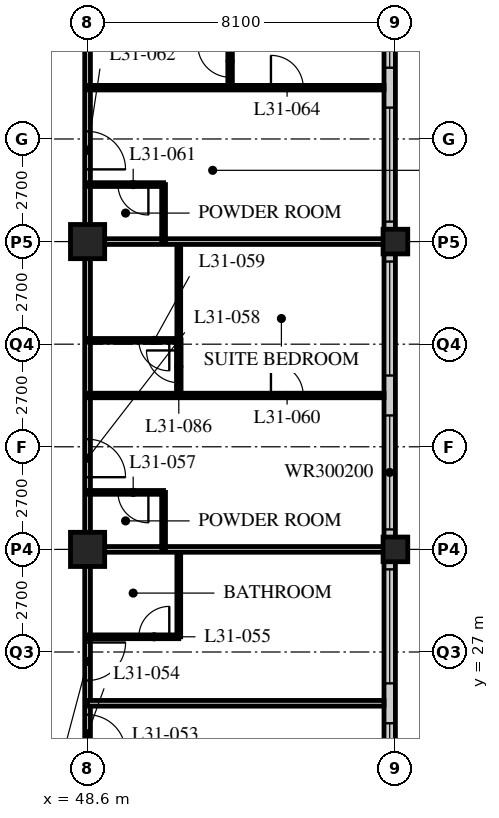
"""IFC4 building model, lengths in metres.
Left out: names, types, materials, properties, quantities, classifications, styles, units other than length and angle.
Written with IfcOpenShell. Run it as: python <this file> out.ifc"""

import sys

from ifc_helpers import new_model, si_unit, direction, frame, frame_2d, origin, origin_2d, place, context, subcontext, project, spatial, rectangle, hollow_rectangle, extrude, element, fill, save


model = new_model("IFC4")
c1 = context("Model", 3, precision=1e-05, world=origin(), true_north=direction((0.0, 1.0)))
c2 = subcontext(c1, "Body", "Model", "MODEL_VIEW")
j1 = project(units=[si_unit("LENGTHUNIT", "METRE"), si_unit("PLANEANGLEUNIT", "RADIAN")], contexts=[c1])
p1 = place(None, origin())
s1 = spatial("IfcSite", under=j1, at=p1, CompositionType="ELEMENT")
p2 = place(p1, origin())
s2 = spatial("IfcBuilding", under=s1, at=p2, CompositionType="ELEMENT")
p3 = place(p2, frame((0.0, 0.0, 123.8)))
s3 = spatial("IfcBuildingStorey", under=s2, at=p3, CompositionType="ELEMENT", Elevation=123.8)
for number, where, z_axis, x_axis in (
    (1, (48.6, 29.7, 0.0), (0.0, 0.0, 1.0), (1.0, 0.0, 0.0)),
    (2, (48.6, 37.8, 0.0), (0.0, 0.0, 1.0), (1.0, 0.0, 0.0)),
):
    element("IfcColumn", number, at=place(p3, frame(where, z_axis=z_axis, x_axis=x_axis)), inside=s3, PredefinedType="COLUMN", context=c2, shape_type="SweptSolid", body=[
        extrude(hollow_rectangle(XDim=0.9, YDim=0.9, WallThickness=0.09, at=origin_2d()), origin(), (0.0, 0.0, 1.0), 3.4),
    ])
for number, where, z_axis, x_axis in (
    (3, (56.7, 29.7, 0.0), (0.0, 0.0, 1.0), (1.0, 0.0, 0.0)),
    (4, (56.7, 37.8, 0.0), (0.0, 0.0, 1.0), (1.0, 0.0, 0.0)),
):
    element("IfcColumn", number, at=place(p3, frame(where, z_axis=z_axis, x_axis=x_axis)), inside=s3, PredefinedType="COLUMN", context=c2, shape_type="SweptSolid", body=[
        extrude(hollow_rectangle(XDim=0.65, YDim=0.65, WallThickness=0.055, at=origin_2d()), origin(), (0.0, 0.0, 1.0), 3.4),
    ])
p4 = place(p3, frame((56.55, 13.8, 0.0), z_axis=(0.0, 0.0, 1.0), x_axis=(0.0, 1.0, 0.0)))
e5 = element("IfcWall", 5, at=p4, inside=s3, PredefinedType="SOLIDWALL", context=c2, shape_type="SweptSolid", body=[
    extrude(rectangle(XDim=32.1, YDim=0.3, at=frame_2d((16.05, 0.0))), origin(), (0.0, 0.0, 1.0), 3.19),
])
p5 = place(p4, frame((0.225, 0.0, 0.9)))
e6 = element("IfcOpeningElement", 6, at=p5, cuts=e5, PredefinedType="OPENING", context=c2, shape_type="SweptSolid", body=[
    extrude(rectangle(XDim=3.0, YDim=2.0, at=frame_2d((1.5, 1.0))), frame((0.0, 0.16, 0.0), z_axis=(0.0, -1.0, 0.0), x_axis=(1.0, 0.0, 0.0)), (0.0, 0.0, 1.0), 0.32),
])
p6 = place(p4, frame((4.275, 0.0, 0.9)))
e7 = element("IfcOpeningElement", 7, at=p6, cuts=e5, PredefinedType="OPENING", context=c2, shape_type="SweptSolid", body=[
    extrude(rectangle(XDim=3.0, YDim=2.0, at=frame_2d((1.5, 1.0))), frame((0.0, 0.16, 0.0), z_axis=(0.0, -1.0, 0.0), x_axis=(1.0, 0.0, 0.0)), (0.0, 0.0, 1.0), 0.32),
])
p7 = place(p4, frame((8.325, 0.0, 0.9)))
e8 = element("IfcOpeningElement", 8, at=p7, cuts=e5, PredefinedType="OPENING", context=c2, shape_type="SweptSolid", body=[
    extrude(rectangle(XDim=3.0, YDim=2.0, at=frame_2d((1.5, 1.0))), frame((0.0, 0.16, 0.0), z_axis=(0.0, -1.0, 0.0), x_axis=(1.0, 0.0, 0.0)), (0.0, 0.0, 1.0), 0.32),
])
p8 = place(p4, frame((12.375, 0.0, 0.9)))
e9 = element("IfcOpeningElement", 9, at=p8, cuts=e5, PredefinedType="OPENING", context=c2, shape_type="SweptSolid", body=[
    extrude(rectangle(XDim=3.0, YDim=2.0, at=frame_2d((1.5, 1.0))), frame((0.0, 0.16, 0.0), z_axis=(0.0, -1.0, 0.0), x_axis=(1.0, 0.0, 0.0)), (0.0, 0.0, 1.0), 0.32),
])
p9 = place(p4, frame((16.425, 0.0, 0.9)))
e10 = element("IfcOpeningElement", 10, at=p9, cuts=e5, PredefinedType="OPENING", context=c2, shape_type="SweptSolid", body=[
    extrude(rectangle(XDim=3.0, YDim=2.0, at=frame_2d((1.5, 1.0))), frame((0.0, 0.16, 0.0), z_axis=(0.0, -1.0, 0.0), x_axis=(1.0, 0.0, 0.0)), (0.0, 0.0, 1.0), 0.32),
])
p10 = place(p4, frame((20.475, 0.0, 0.9)))
e11 = element("IfcOpeningElement", 11, at=p10, cuts=e5, PredefinedType="OPENING", context=c2, shape_type="SweptSolid", body=[
    extrude(rectangle(XDim=3.0, YDim=2.0, at=frame_2d((1.5, 1.0))), frame((0.0, 0.16, 0.0), z_axis=(0.0, -1.0, 0.0), x_axis=(1.0, 0.0, 0.0)), (0.0, 0.0, 1.0), 0.32),
])
p11 = place(p4, frame((24.525, 0.0, 0.9)))
e12 = element("IfcOpeningElement", 12, at=p11, cuts=e5, PredefinedType="OPENING", context=c2, shape_type="SweptSolid", body=[
    extrude(rectangle(XDim=3.0, YDim=2.0, at=frame_2d((1.5, 1.0))), frame((0.0, 0.16, 0.0), z_axis=(0.0, -1.0, 0.0), x_axis=(1.0, 0.0, 0.0)), (0.0, 0.0, 1.0), 0.32),
])
p12 = place(p4, frame((28.575, 0.0, 0.9)))
e13 = element("IfcOpeningElement", 13, at=p12, cuts=e5, PredefinedType="OPENING", context=c2, shape_type="SweptSolid", body=[
    extrude(rectangle(XDim=3.0, YDim=2.0, at=frame_2d((1.5, 1.0))), frame((0.0, 0.16, 0.0), z_axis=(0.0, -1.0, 0.0), x_axis=(1.0, 0.0, 0.0)), (0.0, 0.0, 1.0), 0.32),
])
p13 = place(p3, frame((48.6, 21.6, 0.0), z_axis=(0.0, 0.0, 1.0), x_axis=(0.0, 1.0, 0.0)))
e14 = element("IfcWall", 14, at=p13, inside=s3, PredefinedType="PARTITIONING", context=c2, shape_type="SweptSolid", body=[
    extrude(rectangle(XDim=24.3, YDim=0.15, at=frame_2d((12.15, 0.0))), origin(), (0.0, 0.0, 1.0), 2.578),
])
p14 = place(p13, frame((2.75, 0.0, 0.0)))
e15 = element("IfcOpeningElement", 15, at=p14, cuts=e14, PredefinedType="OPENING", context=c2, shape_type="SweptSolid", body=[
    extrude(rectangle(XDim=1.0, YDim=2.1, at=frame_2d((0.5, 1.05))), frame((0.0, 0.085, 0.0), z_axis=(0.0, -1.0, 0.0), x_axis=(1.0, 0.0, 0.0)), (0.0, 0.0, 1.0), 0.17),
])
p15 = place(p13, frame((4.65, 0.0, 0.0)))
e16 = element("IfcOpeningElement", 16, at=p15, cuts=e14, PredefinedType="OPENING", context=c2, shape_type="SweptSolid", body=[
    extrude(rectangle(XDim=1.0, YDim=2.1, at=frame_2d((0.5, 1.05))), frame((0.0, 0.085, 0.0), z_axis=(0.0, -1.0, 0.0), x_axis=(1.0, 0.0, 0.0)), (0.0, 0.0, 1.0), 0.17),
])
p16 = place(p13, frame((10.0, 0.0, 0.0)))
e17 = element("IfcOpeningElement", 17, at=p16, cuts=e14, PredefinedType="OPENING", context=c2, shape_type="SweptSolid", body=[
    extrude(rectangle(XDim=1.0, YDim=2.1, at=frame_2d((0.5, 1.05))), frame((0.0, 0.085, 0.0), z_axis=(0.0, -1.0, 0.0), x_axis=(1.0, 0.0, 0.0)), (0.0, 0.0, 1.0), 0.17),
])
p17 = place(p13, frame((18.1, 0.0, 0.0)))
e18 = element("IfcOpeningElement", 18, at=p17, cuts=e14, PredefinedType="OPENING", context=c2, shape_type="SweptSolid", body=[
    extrude(rectangle(XDim=1.0, YDim=2.1, at=frame_2d((0.5, 1.05))), frame((0.0, 0.085, 0.0), z_axis=(0.0, -1.0, 0.0), x_axis=(1.0, 0.0, 0.0)), (0.0, 0.0, 1.0), 0.17),
])
p18 = place(p3, frame((48.6, 25.65, 0.0), z_axis=(0.0, 0.0, 1.0), x_axis=(1.0, 0.0, 0.0)))
e19 = element("IfcWall", 19, at=p18, inside=s3, PredefinedType="PARTITIONING", context=c2, shape_type="SweptSolid", body=[
    extrude(rectangle(XDim=7.8, YDim=0.15, at=frame_2d((3.9, 0.0))), origin(), (0.0, 0.0, 1.0), 3.19),
])
p19 = place(p3, frame((51.0, 27.4, 0.0), z_axis=(0.0, 0.0, 1.0), x_axis=(0.0, 1.0, 0.0)))
e20 = element("IfcWall", 20, at=p19, inside=s3, PredefinedType="PARTITIONING", context=c2, shape_type="SweptSolid", body=[
    extrude(rectangle(XDim=2.3, YDim=0.1, at=frame_2d((1.15, 0.0))), origin(), (0.0, 0.0, 1.0), 3.19),
])
p20 = place(p3, frame((48.6, 27.4, 0.0), z_axis=(0.0, 0.0, 1.0), x_axis=(1.0, 0.0, 0.0)))
e21 = element("IfcWall", 21, at=p20, inside=s3, PredefinedType="PARTITIONING", context=c2, shape_type="SweptSolid", body=[
    extrude(rectangle(XDim=2.4, YDim=0.1, at=frame_2d((1.2, 0.0))), origin(), (0.0, 0.0, 1.0), 3.19),
])
p21 = place(p20, frame((1.35, 0.0, 0.0)))
e22 = element("IfcOpeningElement", 22, at=p21, cuts=e21, PredefinedType="OPENING", context=c2, shape_type="SweptSolid", body=[
    extrude(rectangle(XDim=0.8, YDim=2.1, at=frame_2d((0.4, 1.05))), frame((0.0, 0.06, 0.0), z_axis=(0.0, -1.0, 0.0), x_axis=(1.0, 0.0, 0.0)), (0.0, 0.0, 1.0), 0.12),
])
p22 = place(p3, frame((48.6, 29.7, 0.0), z_axis=(0.0, 0.0, 1.0), x_axis=(1.0, 0.0, 0.0)))
e23 = element("IfcWall", 23, at=p22, inside=s3, PredefinedType="PARTITIONING", context=c2, shape_type="SweptSolid", body=[
    extrude(rectangle(XDim=7.8, YDim=0.15, at=frame_2d((3.9, 0.0))), origin(), (0.0, 0.0, 1.0), 2.578),
])
p23 = place(p3, frame((50.6, 29.7, 0.0), z_axis=(0.0, 0.0, 1.0), x_axis=(0.0, 1.0, 0.0)))
e24 = element("IfcWall", 24, at=p23, inside=s3, PredefinedType="PARTITIONING", context=c2, shape_type="SweptSolid", body=[
    extrude(rectangle(XDim=1.5, YDim=0.1, at=frame_2d((0.75, 0.0))), origin(), (0.0, 0.0, 1.0), 3.19),
])
p24 = place(p3, frame((48.6, 31.2, 0.0), z_axis=(0.0, 0.0, 1.0), x_axis=(1.0, 0.0, 0.0)))
e25 = element("IfcWall", 25, at=p24, inside=s3, PredefinedType="PARTITIONING", context=c2, shape_type="SweptSolid", body=[
    extrude(rectangle(XDim=2.0, YDim=0.1, at=frame_2d((1.0, 0.0))), origin(), (0.0, 0.0, 1.0), 3.19),
])
p25 = place(p24, frame((0.8, 0.0, 0.0)))
e26 = element("IfcOpeningElement", 26, at=p25, cuts=e25, PredefinedType="OPENING", context=c2, shape_type="SweptSolid", body=[
    extrude(rectangle(XDim=0.8, YDim=2.1, at=frame_2d((0.4, 1.05))), frame((0.0, 0.06, 0.0), z_axis=(0.0, -1.0, 0.0), x_axis=(1.0, 0.0, 0.0)), (0.0, 0.0, 1.0), 0.12),
])
p26 = place(p3, frame((51.0, 35.2, 0.0), z_axis=(0.0, 0.0, 1.0), x_axis=(0.0, 1.0, 0.0)))
e27 = element("IfcWall", 27, at=p26, inside=s3, PredefinedType="PARTITIONING", context=c2, shape_type="SweptSolid", body=[
    extrude(rectangle(XDim=2.6, YDim=0.1, at=frame_2d((1.3, 0.0))), origin(), (0.0, 0.0, 1.0), 3.19),
])
p27 = place(p3, frame((48.6, 35.2, 0.0), z_axis=(0.0, 0.0, 1.0), x_axis=(1.0, 0.0, 0.0)))
e28 = element("IfcWall", 28, at=p27, inside=s3, PredefinedType="PARTITIONING", context=c2, shape_type="SweptSolid", body=[
    extrude(rectangle(XDim=2.4, YDim=0.1, at=frame_2d((1.2, 0.0))), origin(), (0.0, 0.0, 1.0), 3.19),
])
p28 = place(p27, frame((1.35, 0.0, 0.0)))
e29 = element("IfcOpeningElement", 29, at=p28, cuts=e28, PredefinedType="OPENING", context=c2, shape_type="SweptSolid", body=[
    extrude(rectangle(XDim=0.8, YDim=2.1, at=frame_2d((0.4, 1.05))), frame((0.0, 0.06, 0.0), z_axis=(0.0, -1.0, 0.0), x_axis=(1.0, 0.0, 0.0)), (0.0, 0.0, 1.0), 0.12),
])
p29 = place(p3, frame((48.6, 33.75, 0.0), z_axis=(0.0, 0.0, 1.0), x_axis=(1.0, 0.0, 0.0)))
e30 = element("IfcWall", 30, at=p29, inside=s3, PredefinedType="PARTITIONING", context=c2, shape_type="SweptSolid", body=[
    extrude(rectangle(XDim=7.8, YDim=0.12, at=frame_2d((3.9, 0.0))), origin(), (0.0, 0.0, 1.0), 3.19),
])
p30 = place(p29, frame((4.825, 0.0, 0.0)))
e31 = element("IfcOpeningElement", 31, at=p30, cuts=e30, PredefinedType="OPENING", context=c2, shape_type="SweptSolid", body=[
    extrude(rectangle(XDim=0.85, YDim=2.1, at=frame_2d((0.425, 1.05))), frame((0.0, 0.07, 0.0), z_axis=(0.0, -1.0, 0.0), x_axis=(1.0, 0.0, 0.0)), (0.0, 0.0, 1.0), 0.14),
])
p31 = place(p3, frame((48.6, 37.8, 0.0), z_axis=(0.0, 0.0, 1.0), x_axis=(1.0, 0.0, 0.0)))
e32 = element("IfcWall", 32, at=p31, inside=s3, PredefinedType="PARTITIONING", context=c2, shape_type="SweptSolid", body=[
    extrude(rectangle(XDim=7.8, YDim=0.15, at=frame_2d((3.9, 0.0))), origin(), (0.0, 0.0, 1.0), 2.578),
])
p32 = place(p3, frame((50.6, 37.8, 0.0), z_axis=(0.0, 0.0, 1.0), x_axis=(0.0, 1.0, 0.0)))
e33 = element("IfcWall", 33, at=p32, inside=s3, PredefinedType="PARTITIONING", context=c2, shape_type="SweptSolid", body=[
    extrude(rectangle(XDim=1.5, YDim=0.1, at=frame_2d((0.75, 0.0))), origin(), (0.0, 0.0, 1.0), 3.19),
])
p33 = place(p3, frame((48.6, 39.3, 0.0), z_axis=(0.0, 0.0, 1.0), x_axis=(1.0, 0.0, 0.0)))
e34 = element("IfcWall", 34, at=p33, inside=s3, PredefinedType="PARTITIONING", context=c2, shape_type="SweptSolid", body=[
    extrude(rectangle(XDim=2.0, YDim=0.1, at=frame_2d((1.0, 0.0))), origin(), (0.0, 0.0, 1.0), 3.19),
])
p34 = place(p33, frame((0.8, 0.0, 0.0)))
e35 = element("IfcOpeningElement", 35, at=p34, cuts=e34, PredefinedType="OPENING", context=c2, shape_type="SweptSolid", body=[
    extrude(rectangle(XDim=0.8, YDim=2.1, at=frame_2d((0.4, 1.05))), frame((0.0, 0.06, 0.0), z_axis=(0.0, -1.0, 0.0), x_axis=(1.0, 0.0, 0.0)), (0.0, 0.0, 1.0), 0.12),
])
p35 = place(p3, frame((48.6, 41.85, 0.0), z_axis=(0.0, 0.0, 1.0), x_axis=(1.0, 0.0, 0.0)))
e36 = element("IfcWall", 36, at=p35, inside=s3, PredefinedType="PARTITIONING", context=c2, shape_type="SweptSolid", body=[
    extrude(rectangle(XDim=7.8, YDim=0.12, at=frame_2d((3.9, 0.0))), origin(), (0.0, 0.0, 1.0), 3.19),
])
p36 = place(p35, frame((4.825, 0.0, 0.0)))
e37 = element("IfcOpeningElement", 37, at=p36, cuts=e36, PredefinedType="OPENING", context=c2, shape_type="SweptSolid", body=[
    extrude(rectangle(XDim=0.85, YDim=2.1, at=frame_2d((0.425, 1.05))), frame((0.0, 0.07, 0.0), z_axis=(0.0, -1.0, 0.0), x_axis=(1.0, 0.0, 0.0)), (0.0, 0.0, 1.0), 0.14),
])
p37 = place(p3, frame((51.0, 35.21, 0.0), z_axis=(0.0, 0.0, 1.0), x_axis=(0.0, -1.0, 0.0)))
e38 = element("IfcWall", 38, at=p37, inside=s3, PredefinedType="PARTITIONING", context=c2, shape_type="SweptSolid", body=[
    extrude(rectangle(XDim=1.46, YDim=0.12, at=frame_2d((0.73, 0.0))), origin(), (0.0, 0.0, 1.0), 3.19),
])
p38 = place(p37, frame((0.275, 0.0, 0.0)))
e39 = element("IfcOpeningElement", 39, at=p38, cuts=e38, PredefinedType="OPENING", context=c2, shape_type="SweptSolid", body=[
    extrude(rectangle(XDim=0.85, YDim=2.1, at=frame_2d((0.425, 1.05))), frame((0.0, 0.07, 0.0), z_axis=(0.0, -1.0, 0.0), x_axis=(1.0, 0.0, 0.0)), (0.0, 0.0, 1.0), 0.14),
])
p39 = place(p3, frame((52.35, 45.6, 0.0), z_axis=(0.0, 0.0, 1.0), x_axis=(0.0, -1.0, 0.0)))
e40 = element("IfcWall", 40, at=p39, inside=s3, PredefinedType="PARTITIONING", context=c2, shape_type="SweptSolid", body=[
    extrude(rectangle(XDim=3.75, YDim=0.12, at=frame_2d((1.875, 0.0))), origin(), (0.0, 0.0, 1.0), 3.19),
])
p40 = place(p39, frame((2.625, 0.0, 0.0)))
e41 = element("IfcOpeningElement", 41, at=p40, cuts=e40, PredefinedType="OPENING", context=c2, shape_type="SweptSolid", body=[
    extrude(rectangle(XDim=0.85, YDim=2.1, at=frame_2d((0.425, 1.05))), frame((0.0, 0.07, 0.0), z_axis=(0.0, -1.0, 0.0), x_axis=(1.0, 0.0, 0.0)), (0.0, 0.0, 1.0), 0.14),
])
p41 = place(p7, origin())
e42 = element("IfcWindow", 42, at=p41, inside=s3, PartitioningType="SINGLE_PANEL", PredefinedType="WINDOW", context=c2, shape_type="SweptSolid", body=[
    extrude(rectangle(XDim=3.0, YDim=2.0, at=frame_2d((1.5, 1.0))), frame((0.0, 0.03, 0.0), z_axis=(0.0, -1.0, 0.0), x_axis=(1.0, 0.0, 0.0)), (0.0, 0.0, 1.0), 0.06),
])
fill(e8, e42)
p42 = place(p8, origin())
e43 = element("IfcWindow", 43, at=p42, inside=s3, PartitioningType="SINGLE_PANEL", PredefinedType="WINDOW", context=c2, shape_type="SweptSolid", body=[
    extrude(rectangle(XDim=3.0, YDim=2.0, at=frame_2d((1.5, 1.0))), frame((0.0, 0.03, 0.0), z_axis=(0.0, -1.0, 0.0), x_axis=(1.0, 0.0, 0.0)), (0.0, 0.0, 1.0), 0.06),
])
fill(e9, e43)
p43 = place(p9, origin())
e44 = element("IfcWindow", 44, at=p43, inside=s3, PartitioningType="SINGLE_PANEL", PredefinedType="WINDOW", context=c2, shape_type="SweptSolid", body=[
    extrude(rectangle(XDim=3.0, YDim=2.0, at=frame_2d((1.5, 1.0))), frame((0.0, 0.03, 0.0), z_axis=(0.0, -1.0, 0.0), x_axis=(1.0, 0.0, 0.0)), (0.0, 0.0, 1.0), 0.06),
])
fill(e10, e44)
p44 = place(p10, origin())
e45 = element("IfcWindow", 45, at=p44, inside=s3, PartitioningType="SINGLE_PANEL", PredefinedType="WINDOW", context=c2, shape_type="SweptSolid", body=[
    extrude(rectangle(XDim=3.0, YDim=2.0, at=frame_2d((1.5, 1.0))), frame((0.0, 0.03, 0.0), z_axis=(0.0, -1.0, 0.0), x_axis=(1.0, 0.0, 0.0)), (0.0, 0.0, 1.0), 0.06),
])
fill(e11, e45)
p45 = place(p11, origin())
e46 = element("IfcWindow", 46, at=p45, inside=s3, PartitioningType="SINGLE_PANEL", PredefinedType="WINDOW", context=c2, shape_type="SweptSolid", body=[
    extrude(rectangle(XDim=3.0, YDim=2.0, at=frame_2d((1.5, 1.0))), frame((0.0, 0.03, 0.0), z_axis=(0.0, -1.0, 0.0), x_axis=(1.0, 0.0, 0.0)), (0.0, 0.0, 1.0), 0.06),
])
fill(e12, e46)
p46 = place(p12, origin())
e47 = element("IfcWindow", 47, at=p46, inside=s3, PartitioningType="SINGLE_PANEL", PredefinedType="WINDOW", context=c2, shape_type="SweptSolid", body=[
    extrude(rectangle(XDim=3.0, YDim=2.0, at=frame_2d((1.5, 1.0))), frame((0.0, 0.03, 0.0), z_axis=(0.0, -1.0, 0.0), x_axis=(1.0, 0.0, 0.0)), (0.0, 0.0, 1.0), 0.06),
])
fill(e13, e47)
p47 = place(p14, origin())
e48 = element("IfcDoor", 48, at=p47, inside=s3, OperationType="SINGLE_SWING_RIGHT", PredefinedType="DOOR", context=c2, shape_type="SweptSolid", body=[
    extrude(rectangle(XDim=1.0, YDim=2.1, at=frame_2d((0.5, 1.05))), frame((0.0, 0.025, 0.0), z_axis=(0.0, -1.0, 0.0), x_axis=(1.0, 0.0, 0.0)), (0.0, 0.0, 1.0), 0.05),
])
fill(e15, e48)
p48 = place(p21, origin())
e49 = element("IfcDoor", 49, at=p48, inside=s3, OperationType="SINGLE_SWING_RIGHT", PredefinedType="DOOR", context=c2, shape_type="SweptSolid", body=[
    extrude(rectangle(XDim=0.8, YDim=2.1, at=frame_2d((0.4, 1.05))), frame((0.0, 0.025, 0.0), z_axis=(0.0, -1.0, 0.0), x_axis=(1.0, 0.0, 0.0)), (0.0, 0.0, 1.0), 0.05),
])
fill(e22, e49)
p49 = place(p15, origin())
e50 = element("IfcDoor", 50, at=p49, inside=s3, OperationType="SINGLE_SWING_LEFT", PredefinedType="DOOR", context=c2, shape_type="SweptSolid", body=[
    extrude(rectangle(XDim=1.0, YDim=2.1, at=frame_2d((0.5, 1.05))), frame((0.0, 0.025, 0.0), z_axis=(0.0, -1.0, 0.0), x_axis=(1.0, 0.0, 0.0)), (0.0, 0.0, 1.0), 0.05),
])
fill(e16, e50)
p50 = place(p25, origin())
e51 = element("IfcDoor", 51, at=p50, inside=s3, OperationType="SINGLE_SWING_LEFT", PredefinedType="DOOR", context=c2, shape_type="SweptSolid", body=[
    extrude(rectangle(XDim=0.8, YDim=2.1, at=frame_2d((0.4, 1.05))), frame((0.0, 0.025, 0.0), z_axis=(0.0, -1.0, 0.0), x_axis=(1.0, 0.0, 0.0)), (0.0, 0.0, 1.0), 0.05),
])
fill(e26, e51)
p51 = place(p16, origin())
e52 = element("IfcDoor", 52, at=p51, inside=s3, OperationType="SINGLE_SWING_RIGHT", PredefinedType="DOOR", context=c2, shape_type="SweptSolid", body=[
    extrude(rectangle(XDim=1.0, YDim=2.1, at=frame_2d((0.5, 1.05))), frame((0.0, 0.025, 0.0), z_axis=(0.0, -1.0, 0.0), x_axis=(1.0, 0.0, 0.0)), (0.0, 0.0, 1.0), 0.05),
])
fill(e17, e52)
p52 = place(p28, origin())
e53 = element("IfcDoor", 53, at=p52, inside=s3, OperationType="SINGLE_SWING_LEFT", PredefinedType="DOOR", context=c2, shape_type="SweptSolid", body=[
    extrude(rectangle(XDim=0.8, YDim=2.1, at=frame_2d((0.4, 1.05))), frame((0.0, 0.025, 0.0), z_axis=(0.0, -1.0, 0.0), x_axis=(1.0, 0.0, 0.0)), (0.0, 0.0, 1.0), 0.05),
])
fill(e29, e53)
p53 = place(p30, origin())
e54 = element("IfcDoor", 54, at=p53, inside=s3, OperationType="SINGLE_SWING_LEFT", PredefinedType="DOOR", context=c2, shape_type="SweptSolid", body=[
    extrude(rectangle(XDim=0.85, YDim=2.1, at=frame_2d((0.425, 1.05))), frame((0.0, 0.025, 0.0), z_axis=(0.0, -1.0, 0.0), x_axis=(1.0, 0.0, 0.0)), (0.0, 0.0, 1.0), 0.05),
])
fill(e31, e54)
p54 = place(p34, origin())
e55 = element("IfcDoor", 55, at=p54, inside=s3, OperationType="SINGLE_SWING_LEFT", PredefinedType="DOOR", context=c2, shape_type="SweptSolid", body=[
    extrude(rectangle(XDim=0.8, YDim=2.1, at=frame_2d((0.4, 1.05))), frame((0.0, 0.025, 0.0), z_axis=(0.0, -1.0, 0.0), x_axis=(1.0, 0.0, 0.0)), (0.0, 0.0, 1.0), 0.05),
])
fill(e35, e55)
p55 = place(p17, origin())
e56 = element("IfcDoor", 56, at=p55, inside=s3, OperationType="SINGLE_SWING_RIGHT", PredefinedType="DOOR", context=c2, shape_type="SweptSolid", body=[
    extrude(rectangle(XDim=1.0, YDim=2.1, at=frame_2d((0.5, 1.05))), frame((0.0, 0.025, 0.0), z_axis=(0.0, -1.0, 0.0), x_axis=(1.0, 0.0, 0.0)), (0.0, 0.0, 1.0), 0.05),
])
fill(e18, e56)
p56 = place(p36, origin())
e57 = element("IfcDoor", 57, at=p56, inside=s3, OperationType="SINGLE_SWING_LEFT", PredefinedType="DOOR", context=c2, shape_type="SweptSolid", body=[
    extrude(rectangle(XDim=0.85, YDim=2.1, at=frame_2d((0.425, 1.05))), frame((0.0, 0.025, 0.0), z_axis=(0.0, -1.0, 0.0), x_axis=(1.0, 0.0, 0.0)), (0.0, 0.0, 1.0), 0.05),
])
fill(e37, e57)
p57 = place(p38, origin())
e58 = element("IfcDoor", 58, at=p57, inside=s3, OperationType="SINGLE_SWING_RIGHT", PredefinedType="DOOR", context=c2, shape_type="SweptSolid", body=[
    extrude(rectangle(XDim=0.85, YDim=2.1, at=frame_2d((0.425, 1.05))), frame((0.0, 0.025, 0.0), z_axis=(0.0, -1.0, 0.0), x_axis=(1.0, 0.0, 0.0)), (0.0, 0.0, 1.0), 0.05),
])
fill(e39, e58)
p58 = place(p40, origin())
e59 = element("IfcDoor", 59, at=p58, inside=s3, OperationType="SINGLE_SWING_RIGHT", PredefinedType="DOOR", context=c2, shape_type="SweptSolid", body=[
    extrude(rectangle(XDim=0.85, YDim=2.1, at=frame_2d((0.425, 1.05))), frame((0.0, 0.025, 0.0), z_axis=(0.0, -1.0, 0.0), x_axis=(1.0, 0.0, 0.0)), (0.0, 0.0, 1.0), 0.05),
])
fill(e41, e59)
save(model, sys.argv[1])
